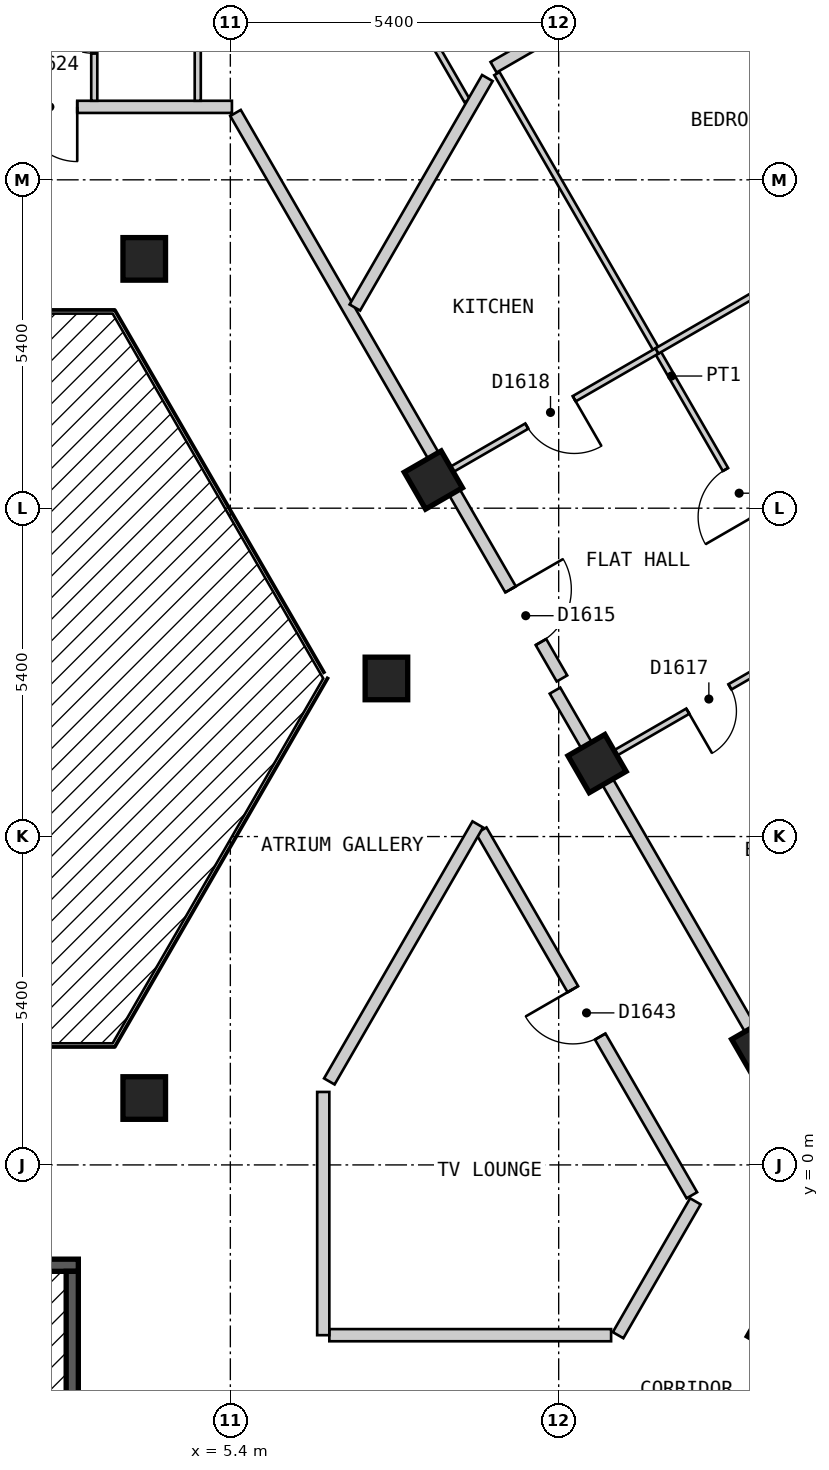
"""IFC4 building model, lengths in metres.
Left out: names, types, materials, properties, quantities, classifications, styles, units other than length and angle.
Written with IfcOpenShell. Run it as: python <this file> out.ifc"""

import sys

from ifc_helpers import new_model, si_unit, direction, frame, frame_2d, origin, origin_2d, place, context, subcontext, project, spatial, rectangle, extrude, element, fill, save


model = new_model("IFC4")
c1 = context("Model", 3, precision=1e-05, world=origin(), true_north=direction((0.0, 1.0)))
c2 = subcontext(c1, "Body", "Model", "MODEL_VIEW")
j1 = project(units=[si_unit("LENGTHUNIT", "METRE"), si_unit("PLANEANGLEUNIT", "RADIAN")], contexts=[c1])
p1 = place(None, origin())
s1 = spatial("IfcSite", under=j1, at=p1, CompositionType="ELEMENT")
p2 = place(p1, origin())
s2 = spatial("IfcBuilding", under=s1, at=p2, CompositionType="ELEMENT")
p3 = place(p2, frame((0.0, 0.0, 169.2)))
s3 = spatial("IfcBuildingStorey", under=s2, at=p3, CompositionType="ELEMENT", Elevation=169.2)
for number, where, z_axis, x_axis in (
    (1, (14.382, -2.689, 0.0), (0.0, 0.0, 1.0), (0.5, 0.866, 0.0)),
    (2, (14.123, 1.937, 0.0), (0.0, 0.0, 1.0), (-0.5, 0.866, 0.0)),
    (3, (3.984, 1.1, 0.0), (0.0, 0.0, 1.0), (1.0, 0.0, 0.0)),
    (4, (11.431, 6.6, 0.0), (0.0, 0.0, 1.0), (-0.5, 0.866, 0.0)),
    (5, (7.967, 8.0, 0.0), (0.0, 0.0, 1.0), (1.0, 0.0, 0.0)),
    (6, (8.739, 11.263, 0.0), (0.0, 0.0, 1.0), (-0.5, 0.866, 0.0)),
    (7, (3.984, 14.9, 0.0), (0.0, 0.0, 1.0), (1.0, 0.0, 0.0)),
):
    element("IfcColumn", number, at=place(p3, frame(where, z_axis=z_axis, x_axis=x_axis)), inside=s3, PredefinedType="COLUMN", context=c2, shape_type="SweptSolid", body=[
        extrude(rectangle(XDim=0.7, YDim=0.7, at=origin_2d()), origin(), (0.0, 0.0, 1.0), 3.0),
    ])
p4 = place(p3, frame((-2.9, -1.65, 0.0), z_axis=(0.0, 0.0, 1.0), x_axis=(1.0, 0.0, 0.0)))
e8 = element("IfcWall", 8, at=p4, inside=s3, PredefinedType="SOLIDWALL", context=c2, shape_type="SweptSolid", body=[
    extrude(rectangle(XDim=5.8, YDim=0.2, at=frame_2d((2.9, 0.0))), origin(), (0.0, 0.0, 1.0), 2.7),
])
p5 = place(p4, frame((0.3, 0.0, 0.0)))
e9 = element("IfcOpeningElement", 9, at=p5, cuts=e8, PredefinedType="OPENING", context=c2, shape_type="SweptSolid", body=[
    extrude(rectangle(XDim=1.2, YDim=2.1, at=frame_2d((0.6, 1.05))), frame((0.0, 0.11, 0.0), z_axis=(0.0, -1.0, 0.0), x_axis=(1.0, 0.0, 0.0)), (0.0, 0.0, 1.0), 0.22),
])
p6 = place(p3, frame((2.8, -4.5, 0.0), z_axis=(0.0, 0.0, 1.0), x_axis=(0.0, 1.0, 0.0)))
e10 = element("IfcWall", 10, at=p6, inside=s3, PredefinedType="SOLIDWALL", context=c2, shape_type="SweptSolid", body=[
    extrude(rectangle(XDim=2.75, YDim=0.2, at=frame_2d((1.375, 0.0))), origin(), (0.0, 0.0, 1.0), 2.7),
])
p7 = place(p3, frame((9.526, 5.5, 0.0), z_axis=(0.0, 0.0, 1.0), x_axis=(0.500062092869, -0.865989551482, 0.0)))
e11 = element("IfcWall", 11, at=p7, inside=s3, PredefinedType="PARTITIONING", context=c2, shape_type="SweptSolid", body=[
    extrude(rectangle(XDim=6.927, YDim=0.2, at=frame_2d((3.464, 0.0))), origin(), (0.0, 0.0, 1.0), 2.7),
])
p8 = place(p7, frame((3.014, 0.0, 0.0)))
e12 = element("IfcOpeningElement", 12, at=p8, cuts=e11, PredefinedType="OPENING", context=c2, shape_type="SweptSolid", body=[
    extrude(rectangle(XDim=0.9, YDim=2.1, at=frame_2d((0.45, 1.05))), frame((0.0, 0.11, 0.0), z_axis=(0.0, -1.0, 0.0), x_axis=(1.0, 0.0, 0.0)), (0.0, 0.0, 1.0), 0.22),
])
p9 = place(p3, frame((10.739, 7.8, 0.0), z_axis=(0.0, 0.0, 1.0), x_axis=(0.499964311759, -0.86604600742, 0.0)))
e13 = element("IfcWall", 13, at=p9, inside=s3, PredefinedType="PARTITIONING", context=c2, shape_type="SweptSolid", body=[
    extrude(rectangle(XDim=9.583, YDim=0.2, at=frame_2d((4.792, 0.0))), origin(), (0.0, 0.0, 1.0), 2.7),
])
p10 = place(p3, frame((5.485, 17.3, 0.0), z_axis=(0.0, 0.0, 1.0), x_axis=(0.499965832213, -0.866045129667, 0.0)))
e14 = element("IfcWall", 14, at=p10, inside=s3, PredefinedType="PARTITIONING", context=c2, shape_type="SweptSolid", body=[
    extrude(rectangle(XDim=10.739, YDim=0.2, at=frame_2d((5.369, 0.0))), origin(), (0.0, 0.0, 1.0), 2.7),
])
p11 = place(p10, frame((9.047, 0.0, 0.0)))
e15 = element("IfcOpeningElement", 15, at=p11, cuts=e14, PredefinedType="OPENING", context=c2, shape_type="SweptSolid", body=[
    extrude(rectangle(XDim=1.0, YDim=2.1, at=frame_2d((0.5, 1.05))), frame((0.0, 0.11, 0.0), z_axis=(0.0, -1.0, 0.0), x_axis=(1.0, 0.0, 0.0)), (0.0, 0.0, 1.0), 0.22),
])
p12 = place(p3, frame((7.028, -2.8, 0.0), z_axis=(0.0, 0.0, 1.0), x_axis=(1.0, 0.0, 0.0)))
e16 = element("IfcWall", 16, at=p12, inside=s3, PredefinedType="PARTITIONING", context=c2, shape_type="SweptSolid", body=[
    extrude(rectangle(XDim=4.634, YDim=0.2, at=frame_2d((2.317, 0.0))), origin(), (0.0, 0.0, 1.0), 2.7),
])
p13 = place(p3, frame((-5.312, 17.4, 0.0), z_axis=(0.0, 0.0, 1.0), x_axis=(1.0, 0.0, 0.0)))
e17 = element("IfcWall", 17, at=p13, inside=s3, PredefinedType="PARTITIONING", context=c2, shape_type="SweptSolid", body=[
    extrude(rectangle(XDim=10.738, YDim=0.2, at=frame_2d((5.369, 0.0))), origin(), (0.0, 0.0, 1.0), 2.7),
])
p14 = place(p13, frame((7.294, 0.0, 0.0)))
e18 = element("IfcOpeningElement", 18, at=p14, cuts=e17, PredefinedType="OPENING", context=c2, shape_type="SweptSolid", body=[
    extrude(rectangle(XDim=0.9, YDim=2.1, at=frame_2d((0.45, 1.05))), frame((0.0, 0.11, 0.0), z_axis=(0.0, -1.0, 0.0), x_axis=(1.0, 0.0, 0.0)), (0.0, 0.0, 1.0), 0.22),
])
p15 = place(p3, frame((7.028, 1.373, 0.0), z_axis=(0.0, 0.0, 1.0), x_axis=(0.500065924398, 0.86598733897, 0.0)))
e19 = element("IfcWall", 19, at=p15, inside=s3, PredefinedType="PARTITIONING", context=c2, shape_type="SweptSolid", body=[
    extrude(rectangle(XDim=4.881, YDim=0.2, at=frame_2d((2.44, 0.0))), origin(), (0.0, 0.0, 1.0), 2.7),
])
p16 = place(p3, frame((11.777, -2.8, 0.0), z_axis=(0.0, 0.0, 1.0), x_axis=(0.500085537782, 0.86597601289, 0.0)))
e20 = element("IfcWall", 20, at=p16, inside=s3, PredefinedType="PARTITIONING", context=c2, shape_type="SweptSolid", body=[
    extrude(rectangle(XDim=2.542, YDim=0.2, at=frame_2d((1.271, 0.0))), origin(), (0.0, 0.0, 1.0), 2.7),
])
p17 = place(p3, frame((6.928, -2.8, 0.0), z_axis=(0.0, 0.0, 1.0), x_axis=(0.0, 1.0, 0.0)))
e21 = element("IfcWall", 21, at=p17, inside=s3, PredefinedType="PARTITIONING", context=c2, shape_type="SweptSolid", body=[
    extrude(rectangle(XDim=4.0, YDim=0.2, at=frame_2d((2.0, 0.0))), origin(), (0.0, 0.0, 1.0), 2.7),
])
p18 = place(p3, frame((7.419, 20.749, 0.0), z_axis=(0.0, 0.0, 1.0), x_axis=(0.499917691695, -0.866072919292, 0.0)))
e22 = element("IfcWall", 22, at=p18, inside=s3, PredefinedType="PARTITIONING", context=c2, shape_type="SweptSolid", body=[
    extrude(rectangle(XDim=3.753, YDim=0.1, at=frame_2d((1.876, 0.0))), origin(), (0.0, 0.0, 1.0), 2.7),
])
p19 = place(p18, frame((0.874, 0.0, 0.0)))
e23 = element("IfcOpeningElement", 23, at=p19, cuts=e22, PredefinedType="OPENING", context=c2, shape_type="SweptSolid", body=[
    extrude(rectangle(XDim=0.8, YDim=2.1, at=frame_2d((0.4, 1.05))), frame((0.0, 0.06, 0.0), z_axis=(0.0, -1.0, 0.0), x_axis=(1.0, 0.0, 0.0)), (0.0, 0.0, 1.0), 0.12),
])
p20 = place(p3, frame((9.784, 17.947, 0.0), z_axis=(0.0, 0.0, 1.0), x_axis=(0.500016228266, -0.866016034188, 0.0)))
e24 = element("IfcWall", 24, at=p20, inside=s3, PredefinedType="PARTITIONING", context=c2, shape_type="SweptSolid", body=[
    extrude(rectangle(XDim=11.486, YDim=0.1, at=frame_2d((5.743, 0.0))), origin(), (0.0, 0.0, 1.0), 2.7),
])
p21 = place(p20, frame((7.518, 0.0, 0.0)))
e25 = element("IfcOpeningElement", 25, at=p21, cuts=e24, PredefinedType="OPENING", context=c2, shape_type="SweptSolid", body=[
    extrude(rectangle(XDim=0.9, YDim=2.1, at=frame_2d((0.45, 1.05))), frame((0.0, 0.06, 0.0), z_axis=(0.0, -1.0, 0.0), x_axis=(1.0, 0.0, 0.0)), (0.0, 0.0, 1.0), 0.12),
])
p22 = place(p3, frame((3.162, 20.009, 0.0), z_axis=(0.0, 0.0, 1.0), x_axis=(0.0, -1.0, 0.0)))
e26 = element("IfcWall", 26, at=p22, inside=s3, PredefinedType="PARTITIONING", context=c2, shape_type="SweptSolid", body=[
    extrude(rectangle(XDim=2.509, YDim=0.1, at=frame_2d((1.254, 0.0))), origin(), (0.0, 0.0, 1.0), 2.7),
])
p23 = place(p22, frame((0.829, 0.0, 0.0)))
e27 = element("IfcOpeningElement", 27, at=p23, cuts=e26, PredefinedType="OPENING", context=c2, shape_type="SweptSolid", body=[
    extrude(rectangle(XDim=0.9, YDim=2.1, at=frame_2d((0.45, 1.05))), frame((0.0, 0.06, 0.0), z_axis=(0.0, -1.0, 0.0), x_axis=(1.0, 0.0, 0.0)), (0.0, 0.0, 1.0), 0.12),
])
p24 = place(p3, frame((4.864, 17.5, 0.0), z_axis=(0.0, 0.0, 1.0), x_axis=(0.0, 1.0, 0.0)))
e28 = element("IfcWall", 28, at=p24, inside=s3, PredefinedType="PARTITIONING", context=c2, shape_type="SweptSolid", body=[
    extrude(rectangle(XDim=6.4, YDim=0.1, at=frame_2d((3.2, 0.0))), origin(), (0.0, 0.0, 1.0), 2.7),
])
p25 = place(p24, frame((4.2, 0.0, 0.0)))
e29 = element("IfcOpeningElement", 29, at=p25, cuts=e28, PredefinedType="OPENING", context=c2, shape_type="SweptSolid", body=[
    extrude(rectangle(XDim=0.9, YDim=2.1, at=frame_2d((0.45, 1.05))), frame((0.0, 0.06, 0.0), z_axis=(0.0, -1.0, 0.0), x_axis=(1.0, 0.0, 0.0)), (0.0, 0.0, 1.0), 0.12),
])
p26 = place(p3, frame((11.518, 6.65, 0.0), z_axis=(0.0, 0.0, 1.0), x_axis=(0.865949381454, 0.500131651427, 0.0)))
e30 = element("IfcWall", 30, at=p26, inside=s3, PredefinedType="PARTITIONING", context=c2, shape_type="SweptSolid", body=[
    extrude(rectangle(XDim=4.097, YDim=0.1, at=frame_2d((2.049, 0.0))), origin(), (0.0, 0.0, 1.0), 2.7),
])
p27 = place(p26, frame((1.623, 0.0, 0.0)))
e31 = element("IfcOpeningElement", 31, at=p27, cuts=e30, PredefinedType="OPENING", context=c2, shape_type="SweptSolid", body=[
    extrude(rectangle(XDim=0.8, YDim=2.1, at=frame_2d((0.4, 1.05))), frame((0.0, 0.06, 0.0), z_axis=(0.0, -1.0, 0.0), x_axis=(1.0, 0.0, 0.0)), (0.0, 0.0, 1.0), 0.12),
])
p28 = place(p3, frame((8.999, 11.413, 0.0), z_axis=(0.0, 0.0, 1.0), x_axis=(0.866076396086, 0.499911668341, 0.0)))
e32 = element("IfcWall", 32, at=p28, inside=s3, PredefinedType="PARTITIONING", context=c2, shape_type="SweptSolid", body=[
    extrude(rectangle(XDim=3.947, YDim=0.1, at=frame_2d((1.973, 0.0))), origin(), (0.0, 0.0, 1.0), 2.7),
])
p29 = place(p28, frame((1.474, 0.0, 0.0)))
e33 = element("IfcOpeningElement", 33, at=p29, cuts=e32, PredefinedType="OPENING", context=c2, shape_type="SweptSolid", body=[
    extrude(rectangle(XDim=0.9, YDim=2.1, at=frame_2d((0.45, 1.05))), frame((0.0, 0.06, 0.0), z_axis=(0.0, -1.0, 0.0), x_axis=(1.0, 0.0, 0.0)), (0.0, 0.0, 1.0), 0.12),
])
p30 = place(p3, frame((7.448, 14.1, 0.0), z_axis=(0.0, 0.0, 1.0), x_axis=(0.500013426303, 0.866017651966, 0.0)))
e34 = element("IfcWall", 34, at=p30, inside=s3, PredefinedType="PARTITIONING", context=c2, shape_type="SweptSolid", body=[
    extrude(rectangle(XDim=4.358, YDim=0.2, at=frame_2d((2.179, 0.0))), origin(), (0.0, 0.0, 1.0), 2.7),
])
p31 = place(p3, frame((9.729, 18.051, 0.0), z_axis=(0.0, 0.0, 1.0), x_axis=(0.866038213712, 0.499977811898, 0.0)))
e35 = element("IfcWall", 35, at=p31, inside=s3, PredefinedType="PARTITIONING", context=c2, shape_type="SweptSolid", body=[
    extrude(rectangle(XDim=5.848, YDim=0.2, at=frame_2d((2.924, 0.0))), origin(), (0.0, 0.0, 1.0), 2.7),
])
p32 = place(p3, frame((12.417, 13.386, 0.0), z_axis=(0.0, 0.0, 1.0), x_axis=(0.86599873886, 0.50004618216, 0.0)))
e36 = element("IfcWall", 36, at=p32, inside=s3, PredefinedType="PARTITIONING", context=c2, shape_type="SweptSolid", body=[
    extrude(rectangle(XDim=5.854, YDim=0.1, at=frame_2d((2.927, 0.0))), origin(), (0.0, 0.0, 1.0), 2.7),
])
p33 = place(p32, frame((2.476, 0.0, 0.0)))
e37 = element("IfcOpeningElement", 37, at=p33, cuts=e36, PredefinedType="OPENING", context=c2, shape_type="SweptSolid", body=[
    extrude(rectangle(XDim=0.9, YDim=2.1, at=frame_2d((0.45, 1.05))), frame((0.0, 0.06, 0.0), z_axis=(0.0, -1.0, 0.0), x_axis=(1.0, 0.0, 0.0)), (0.0, 0.0, 1.0), 0.12),
])
p34 = place(p11, origin())
e38 = element("IfcDoor", 38, at=p34, inside=s3, OperationType="SINGLE_SWING_LEFT", PredefinedType="DOOR", context=c2, shape_type="SweptSolid", body=[
    extrude(rectangle(XDim=1.0, YDim=2.1, at=frame_2d((0.5, 1.05))), frame((0.0, 0.025, 0.0), z_axis=(0.0, -1.0, 0.0), x_axis=(1.0, 0.0, 0.0)), (0.0, 0.0, 1.0), 0.05),
])
fill(e15, e38)
p35 = place(p21, origin())
e39 = element("IfcDoor", 39, at=p35, inside=s3, OperationType="SINGLE_SWING_RIGHT", PredefinedType="DOOR", context=c2, shape_type="SweptSolid", body=[
    extrude(rectangle(XDim=0.9, YDim=2.1, at=frame_2d((0.45, 1.05))), frame((0.0, 0.025, 0.0), z_axis=(0.0, -1.0, 0.0), x_axis=(1.0, 0.0, 0.0)), (0.0, 0.0, 1.0), 0.05),
])
fill(e25, e39)
p36 = place(p27, origin())
e40 = element("IfcDoor", 40, at=p36, inside=s3, OperationType="SINGLE_SWING_LEFT", PredefinedType="DOOR", context=c2, shape_type="SweptSolid", body=[
    extrude(rectangle(XDim=0.8, YDim=2.1, at=frame_2d((0.4, 1.05))), frame((0.0, 0.025, 0.0), z_axis=(0.0, -1.0, 0.0), x_axis=(1.0, 0.0, 0.0)), (0.0, 0.0, 1.0), 0.05),
])
fill(e31, e40)
p37 = place(p29, origin())
e41 = element("IfcDoor", 41, at=p37, inside=s3, OperationType="SINGLE_SWING_RIGHT", PredefinedType="DOOR", context=c2, shape_type="SweptSolid", body=[
    extrude(rectangle(XDim=0.9, YDim=2.1, at=frame_2d((0.45, 1.05))), frame((0.0, 0.025, 0.0), z_axis=(0.0, -1.0, 0.0), x_axis=(1.0, 0.0, 0.0)), (0.0, 0.0, 1.0), 0.05),
])
fill(e33, e41)
p38 = place(p14, origin())
e42 = element("IfcDoor", 42, at=p38, inside=s3, OperationType="SINGLE_SWING_RIGHT", PredefinedType="DOOR", context=c2, shape_type="SweptSolid", body=[
    extrude(rectangle(XDim=0.9, YDim=2.1, at=frame_2d((0.45, 1.05))), frame((0.0, 0.025, 0.0), z_axis=(0.0, -1.0, 0.0), x_axis=(1.0, 0.0, 0.0)), (0.0, 0.0, 1.0), 0.05),
])
fill(e18, e42)
p39 = place(p23, origin())
e43 = element("IfcDoor", 43, at=p39, inside=s3, OperationType="SINGLE_SWING_LEFT", PredefinedType="DOOR", context=c2, shape_type="SweptSolid", body=[
    extrude(rectangle(XDim=0.9, YDim=2.1, at=frame_2d((0.45, 1.05))), frame((0.0, 0.025, 0.0), z_axis=(0.0, -1.0, 0.0), x_axis=(1.0, 0.0, 0.0)), (0.0, 0.0, 1.0), 0.05),
])
fill(e27, e43)
p40 = place(p8, origin())
e44 = element("IfcDoor", 44, at=p40, inside=s3, OperationType="SINGLE_SWING_LEFT", PredefinedType="DOOR", context=c2, shape_type="SweptSolid", body=[
    extrude(rectangle(XDim=0.9, YDim=2.1, at=frame_2d((0.45, 1.05))), frame((0.0, 0.025, 0.0), z_axis=(0.0, -1.0, 0.0), x_axis=(1.0, 0.0, 0.0)), (0.0, 0.0, 1.0), 0.05),
])
fill(e12, e44)
save(model, sys.argv[1])
